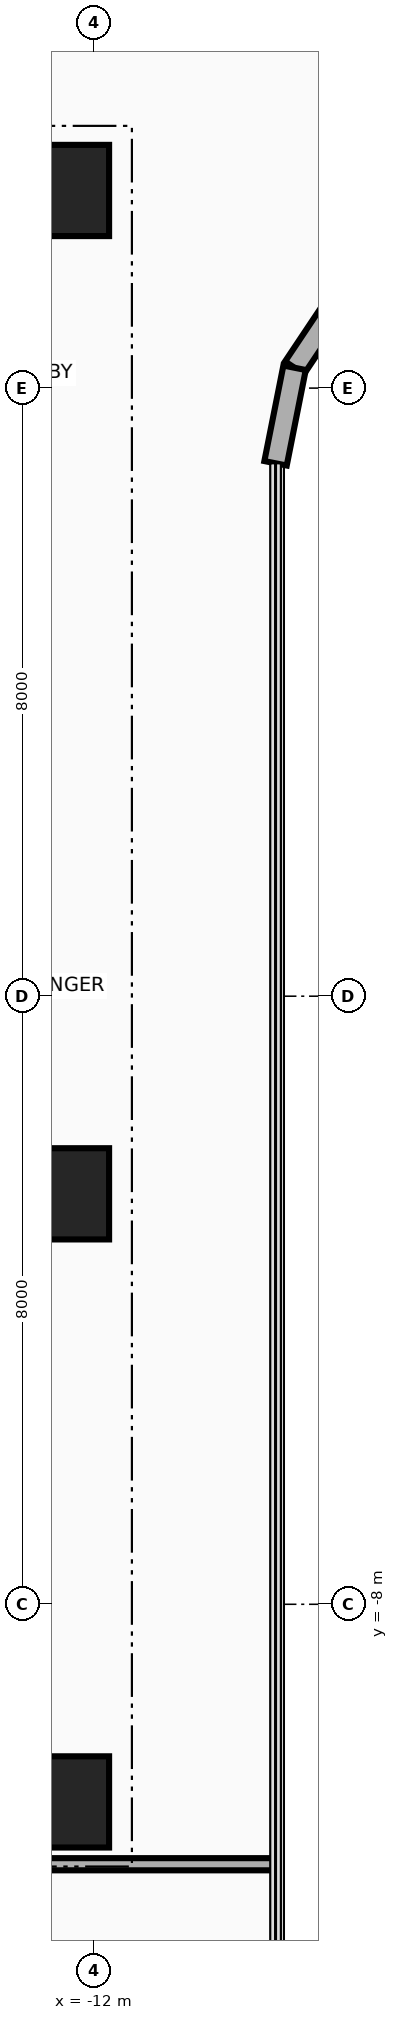
"""IFC4 building model, lengths in metres.
Left out: names, types, materials, properties, quantities, classifications, styles, units other than length and angle.
Written with IfcOpenShell. Run it as: python <this file> out.ifc"""

import sys

from ifc_helpers import new_model, si_unit, direction, frame, frame_2d, origin, origin_2d, place, context, subcontext, project, spatial, rectangle, extrude, source, transform, mapped, element, save


model = new_model("IFC4")
c1 = context("Model", 3, precision=1e-05, world=origin(), true_north=direction((0.0, 1.0)))
c2 = subcontext(c1, "Body", "Model", "MODEL_VIEW")
j1 = project(units=[si_unit("LENGTHUNIT", "METRE"), si_unit("PLANEANGLEUNIT", "RADIAN")], contexts=[c1])
p1 = place(None, origin())
s1 = spatial("IfcSite", under=j1, at=p1, CompositionType="ELEMENT")
p2 = place(p1, origin())
s2 = spatial("IfcBuilding", under=s1, at=p2, CompositionType="ELEMENT")
p3 = place(p2, frame((0.0, 0.0, 105.7)))
s3 = spatial("IfcBuildingStorey", under=s2, at=p3, CompositionType="ELEMENT", Elevation=105.7)
for number, where, z_axis, x_axis in (
    (1, (-22.65, 10.8, 0.0), (0.0, 0.0, 1.0), (1.0, 0.0, 0.0)),
    (2, (-22.65, -10.8, 0.0), (0.0, 0.0, 1.0), (1.0, 0.0, 0.0)),
):
    element("IfcWall", number, at=place(p3, frame(where, z_axis=z_axis, x_axis=x_axis)), inside=s3, PredefinedType="SHEAR", context=c2, shape_type="SweptSolid", body=[
        extrude(rectangle(XDim=10.25, YDim=0.7, at=frame_2d((5.125, 0.0))), origin(), (0.0, 0.0, 1.0), 3.46),
    ])
m1 = source(origin(), c2, "Body", "SweptSolid", [
    extrude(rectangle(XDim=1.2, YDim=1.2, at=origin_2d()), origin(), (0.0, 0.0, 1.0), 3.7),
])
for number, where, z_axis, x_axis in (
    (3, (-12.4, -10.6, 0.0), (0.0, 0.0, 1.0), (1.0, 0.0, 0.0)),
    (4, (-12.4, -2.6, 0.0), (0.0, 0.0, 1.0), (1.0, 0.0, 0.0)),
    (5, (-12.4, 10.6, 0.0), (0.0, 0.0, 1.0), (1.0, 0.0, 0.0)),
):
    element("IfcColumn", number, at=place(p3, frame(where, z_axis=z_axis, x_axis=x_axis)), inside=s3, PredefinedType="COLUMN", context=c2, shape_type="MappedRepresentation", body=[
        mapped(m1, transform((0.0, 0.0, 0.0), x_axis=(1.0, 0.0, 0.0), y_axis=(0.0, 1.0, 0.0), z_axis=(0.0, 0.0, 1.0), scale=1.0)),
    ])
p4 = place(p3, frame((-8.642, 9.342, 0.0), z_axis=(0.0, 0.0, 1.0), x_axis=(-0.555615398575, -0.831439431869, 0.0)))
e6 = element("IfcWall", 6, at=p4, inside=s3, PredefinedType="SOLIDWALL", context=c2, shape_type="SweptSolid", body=[
    extrude(rectangle(XDim=1.292, YDim=0.3, at=frame_2d((0.646, 0.0))), origin(), (0.0, 0.0, 1.0), 3.46),
])
p5 = place(p3, frame((-9.36, 8.268, 0.0), z_axis=(0.0, 0.0, 1.0), x_axis=(-0.195090163074, -0.980785312019, 0.0)))
e7 = element("IfcWall", 7, at=p5, inside=s3, PredefinedType="SOLIDWALL", context=c2, shape_type="SweptSolid", body=[
    extrude(rectangle(XDim=1.281, YDim=0.3, at=frame_2d((0.641, 0.0))), origin(), (0.0, 0.0, 1.0), 3.46),
])
p6 = place(p3, frame((-23.45, -11.42, 0.0), z_axis=(0.0, 0.0, 1.0), x_axis=(1.0, 0.0, 0.0)))
e8 = element("IfcWall", 8, at=p6, inside=s3, PredefinedType="PARTITIONING", context=c2, shape_type="SweptSolid", body=[
    extrude(rectangle(XDim=13.84, YDim=0.16, at=frame_2d((6.92, 0.0))), origin(), (0.0, 0.0, 1.0), 2.834),
])
save(model, sys.argv[1])
